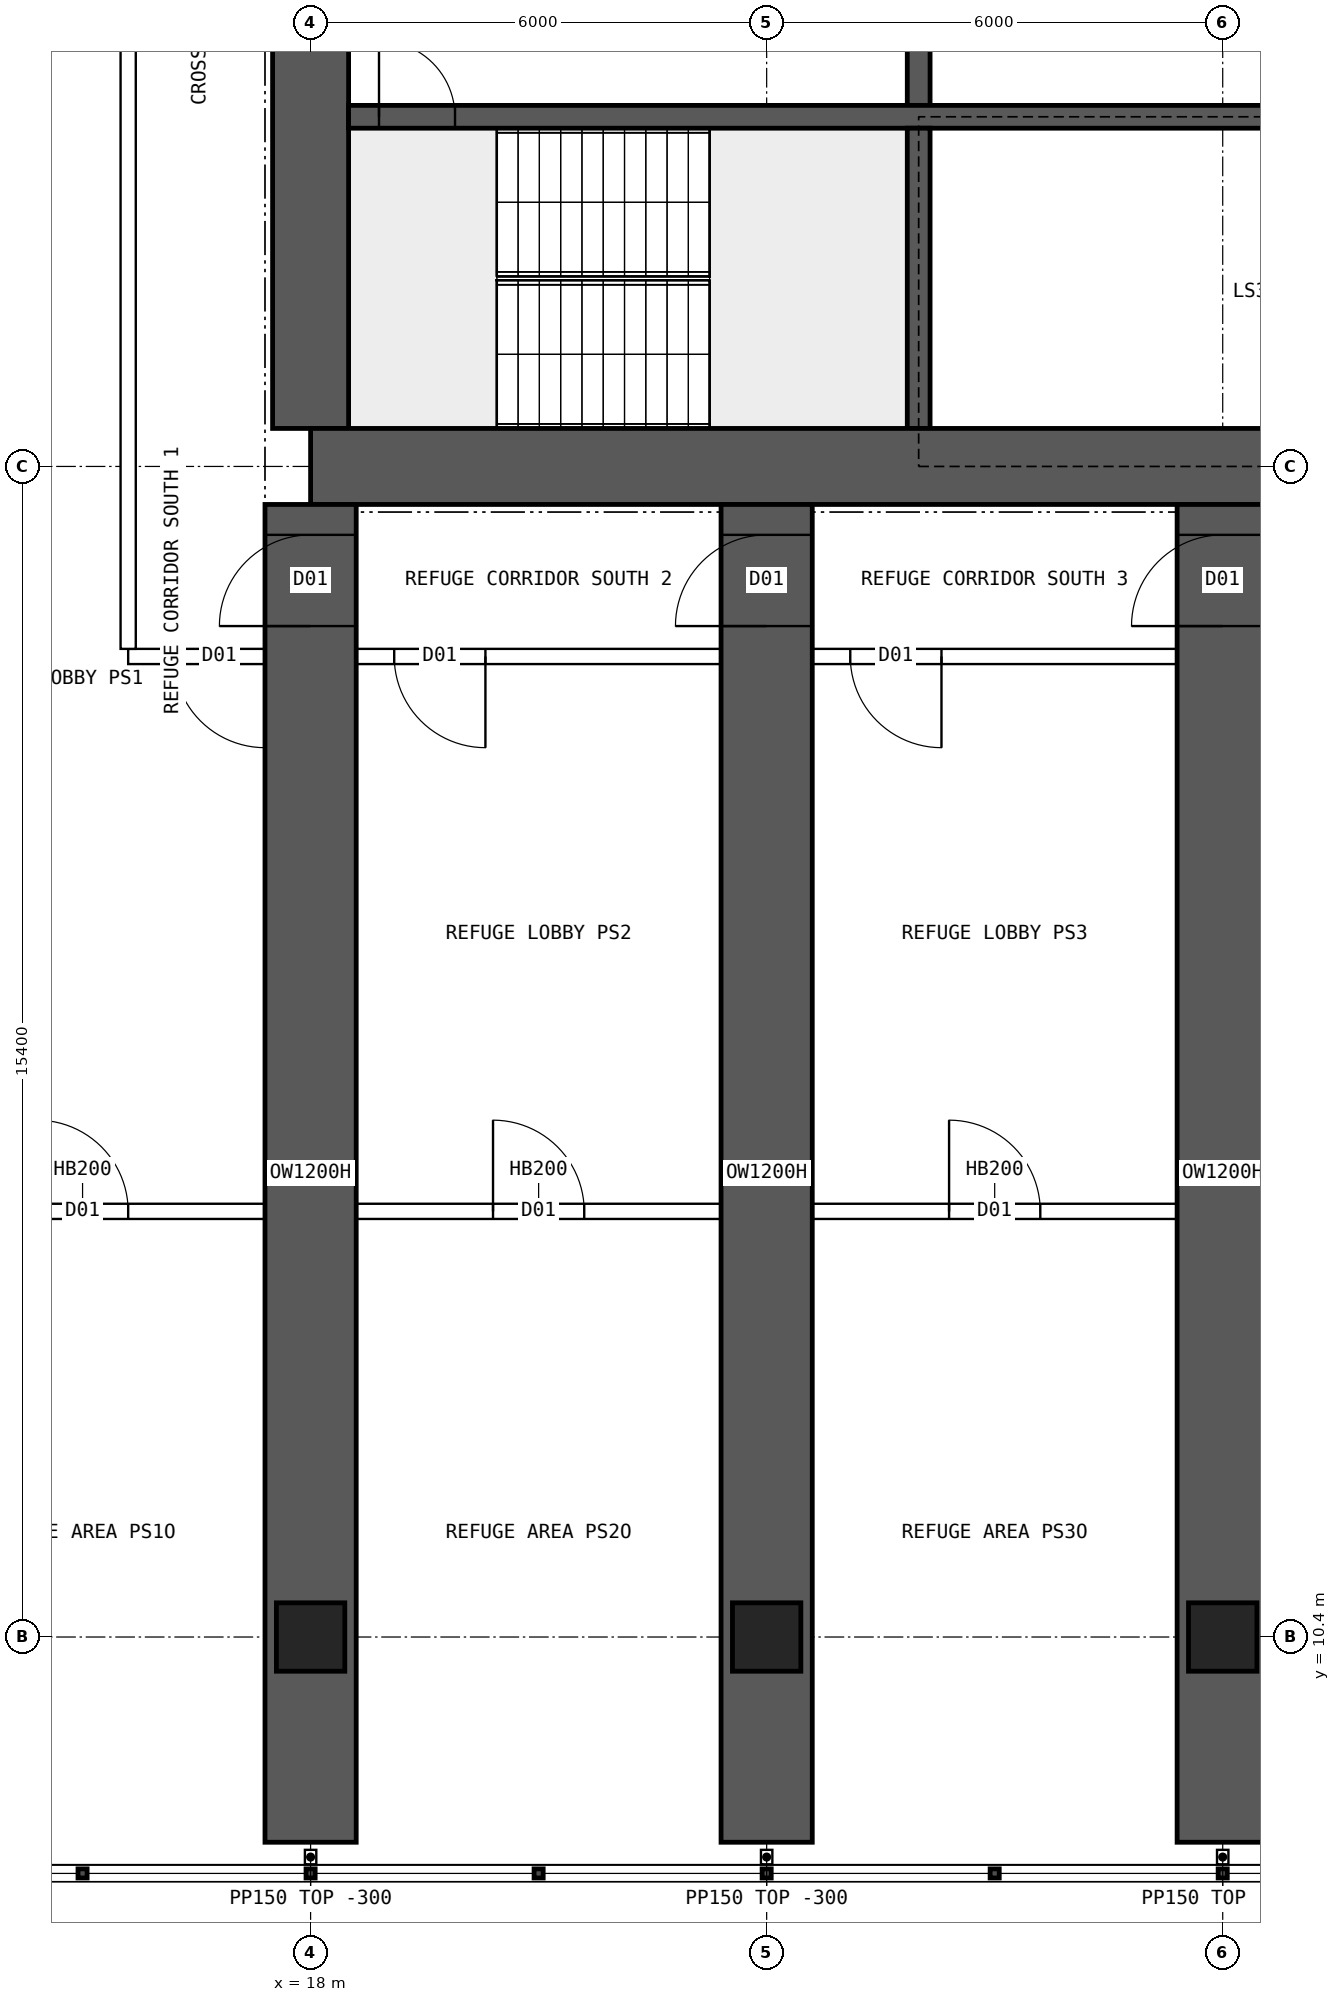
"""IFC4 building model, lengths in metres.
Left out: names, types, materials, properties, quantities, classifications, styles, units other than length and angle.
Written with IfcOpenShell. Run it as: python <this file> out.ifc"""

import sys

from ifc_helpers import new_model, si_unit, direction, frame, frame_2d, origin, origin_2d, place, context, subcontext, project, spatial, rectangle, hollow_rectangle, extrude, element, fill, save


model = new_model("IFC4")
c1 = context("Model", 3, precision=1e-05, world=origin(), true_north=direction((0.0, 1.0)))
c2 = subcontext(c1, "Body", "Model", "MODEL_VIEW")
j1 = project(units=[si_unit("LENGTHUNIT", "METRE"), si_unit("PLANEANGLEUNIT", "RADIAN")], contexts=[c1])
p1 = place(None, origin())
s1 = spatial("IfcSite", under=j1, at=p1, CompositionType="ELEMENT")
p2 = place(p1, origin())
s2 = spatial("IfcBuilding", under=s1, at=p2, CompositionType="ELEMENT")
p3 = place(p2, frame((0.0, 0.0, 68.95)))
s3 = spatial("IfcBuildingStorey", under=s2, at=p3, CompositionType="ELEMENT", Elevation=68.95)
for number, where, z_axis, x_axis in (
    (1, (18.0, 10.4, 0.0), (0.0, 0.0, 1.0), (1.0, 0.0, 0.0)),
    (2, (24.0, 10.4, 0.0), (0.0, 0.0, 1.0), (1.0, 0.0, 0.0)),
    (3, (30.0, 10.4, 0.0), (0.0, 0.0, 1.0), (1.0, 0.0, 0.0)),
):
    element("IfcColumn", number, at=place(p3, frame(where, z_axis=z_axis, x_axis=x_axis)), inside=s3, PredefinedType="COLUMN", context=c2, shape_type="SweptSolid", body=[
        extrude(hollow_rectangle(XDim=0.9, YDim=0.9, WallThickness=0.09, at=origin_2d()), origin(), (0.0, 0.0, 1.0), 7.2),
    ])
p4 = place(p3, frame((18.0, 25.8, 0.0), z_axis=(0.0, 0.0, 1.0), x_axis=(1.0, 0.0, 0.0)))
e4 = element("IfcWall", 4, at=p4, inside=s3, PredefinedType="SHEAR", context=c2, shape_type="SweptSolid", body=[
    extrude(rectangle(XDim=48.0, YDim=1.0, at=frame_2d((24.0, 0.0))), origin(), (0.0, 0.0, 1.0), 7.2),
])
p5 = place(p3, frame((18.0, 26.3, 0.0), z_axis=(0.0, 0.0, 1.0), x_axis=(0.0, 1.0, 0.0)))
e5 = element("IfcWall", 5, at=p5, inside=s3, PredefinedType="SHEAR", context=c2, shape_type="SweptSolid", body=[
    extrude(rectangle(XDim=11.4, YDim=1.0, at=frame_2d((5.7, 0.0))), origin(), (0.0, 0.0, 1.0), 7.2),
])
p6 = place(p5, frame((5.0, 0.0, 0.0)))
e6 = element("IfcOpeningElement", 6, at=p6, cuts=e5, PredefinedType="OPENING", context=c2, shape_type="SweptSolid", body=[
    extrude(rectangle(XDim=1.2, YDim=2.1, at=frame_2d((0.6, 1.05))), frame((0.0, 0.51, 0.0), z_axis=(0.0, -1.0, 0.0), x_axis=(1.0, 0.0, 0.0)), (0.0, 0.0, 1.0), 1.02),
])
p7 = place(p3, frame((18.5, 30.4, 0.0), z_axis=(0.0, 0.0, 1.0), x_axis=(1.0, 0.0, 0.0)))
e7 = element("IfcWall", 7, at=p7, inside=s3, PredefinedType="SHEAR", context=c2, shape_type="SweptSolid", body=[
    extrude(rectangle(XDim=47.0, YDim=0.3, at=frame_2d((23.5, 0.0))), origin(), (0.0, 0.0, 1.0), 7.2),
])
p8 = place(p7, frame((0.4, 0.0, 0.0)))
e8 = element("IfcOpeningElement", 8, at=p8, cuts=e7, PredefinedType="OPENING", context=c2, shape_type="SweptSolid", body=[
    extrude(rectangle(XDim=1.0, YDim=2.1, at=frame_2d((0.5, 1.05))), frame((0.0, 0.16, 0.0), z_axis=(0.0, -1.0, 0.0), x_axis=(1.0, 0.0, 0.0)), (0.0, 0.0, 1.0), 0.32),
])
p9 = place(p7, frame((45.6, 0.0, 0.0)))
e9 = element("IfcOpeningElement", 9, at=p9, cuts=e7, PredefinedType="OPENING", context=c2, shape_type="SweptSolid", body=[
    extrude(rectangle(XDim=1.0, YDim=2.1, at=frame_2d((0.5, 1.05))), frame((0.0, 0.16, 0.0), z_axis=(0.0, -1.0, 0.0), x_axis=(1.0, 0.0, 0.0)), (0.0, 0.0, 1.0), 0.32),
])
p10 = place(p7, frame((30.117, 0.0, 0.0)))
e10 = element("IfcOpeningElement", 10, at=p10, cuts=e7, PredefinedType="OPENING", context=c2, shape_type="SweptSolid", body=[
    extrude(rectangle(XDim=1.1, YDim=2.1, at=frame_2d((0.55, 1.05))), frame((0.0, 0.16, 0.0), z_axis=(0.0, -1.0, 0.0), x_axis=(1.0, 0.0, 0.0)), (0.0, 0.0, 1.0), 0.32),
])
p11 = place(p7, frame((33.65, 0.0, 0.0)))
e11 = element("IfcOpeningElement", 11, at=p11, cuts=e7, PredefinedType="OPENING", context=c2, shape_type="SweptSolid", body=[
    extrude(rectangle(XDim=1.1, YDim=2.1, at=frame_2d((0.55, 1.05))), frame((0.0, 0.16, 0.0), z_axis=(0.0, -1.0, 0.0), x_axis=(1.0, 0.0, 0.0)), (0.0, 0.0, 1.0), 0.32),
])
p12 = place(p7, frame((37.183, 0.0, 0.0)))
e12 = element("IfcOpeningElement", 12, at=p12, cuts=e7, PredefinedType="OPENING", context=c2, shape_type="SweptSolid", body=[
    extrude(rectangle(XDim=1.1, YDim=2.1, at=frame_2d((0.55, 1.05))), frame((0.0, 0.16, 0.0), z_axis=(0.0, -1.0, 0.0), x_axis=(1.0, 0.0, 0.0)), (0.0, 0.0, 1.0), 0.32),
])
p13 = place(p3, frame((26.0, 26.3, 0.0), z_axis=(0.0, 0.0, 1.0), x_axis=(0.0, 1.0, 0.0)))
e13 = element("IfcWall", 13, at=p13, inside=s3, PredefinedType="SHEAR", context=c2, shape_type="SweptSolid", body=[
    extrude(rectangle(XDim=3.95, YDim=0.3, at=frame_2d((1.975, 0.0))), origin(), (0.0, 0.0, 1.0), 7.2),
])
p14 = place(p3, frame((26.0, 30.55, 0.0), z_axis=(0.0, 0.0, 1.0), x_axis=(0.0, 1.0, 0.0)))
e14 = element("IfcWall", 14, at=p14, inside=s3, PredefinedType="SHEAR", context=c2, shape_type="SweptSolid", body=[
    extrude(rectangle(XDim=3.9, YDim=0.3, at=frame_2d((1.95, 0.0))), origin(), (0.0, 0.0, 1.0), 7.2),
])
p15 = place(p14, frame((1.4, 0.0, 0.0)))
e15 = element("IfcOpeningElement", 15, at=p15, cuts=e14, PredefinedType="OPENING", context=c2, shape_type="SweptSolid", body=[
    extrude(rectangle(XDim=1.2, YDim=2.1, at=frame_2d((0.6, 1.05))), frame((0.0, 0.16, 0.0), z_axis=(0.0, -1.0, 0.0), x_axis=(1.0, 0.0, 0.0)), (0.0, 0.0, 1.0), 0.32),
])
p16 = place(p3, frame((18.0, 7.7, 0.0), z_axis=(0.0, 0.0, 1.0), x_axis=(0.0, 1.0, 0.0)))
e16 = element("IfcWall", 16, at=p16, inside=s3, PredefinedType="SHEAR", context=c2, shape_type="SweptSolid", body=[
    extrude(rectangle(XDim=17.6, YDim=1.2, at=frame_2d((8.8, 0.0))), origin(), (0.0, 0.0, 1.0), 7.2),
])
p17 = place(p16, frame((16.0, 0.0, 0.0)))
e17 = element("IfcOpeningElement", 17, at=p17, cuts=e16, PredefinedType="OPENING", context=c2, shape_type="SweptSolid", body=[
    extrude(rectangle(XDim=1.2, YDim=2.1, at=frame_2d((0.6, 1.05))), frame((0.0, 0.61, 0.0), z_axis=(0.0, -1.0, 0.0), x_axis=(1.0, 0.0, 0.0)), (0.0, 0.0, 1.0), 1.22),
])
p18 = place(p3, frame((24.0, 7.7, 0.0), z_axis=(0.0, 0.0, 1.0), x_axis=(0.0, 1.0, 0.0)))
e18 = element("IfcWall", 18, at=p18, inside=s3, PredefinedType="SHEAR", context=c2, shape_type="SweptSolid", body=[
    extrude(rectangle(XDim=17.6, YDim=1.2, at=frame_2d((8.8, 0.0))), origin(), (0.0, 0.0, 1.0), 7.2),
])
p19 = place(p18, frame((16.0, 0.0, 0.0)))
e19 = element("IfcOpeningElement", 19, at=p19, cuts=e18, PredefinedType="OPENING", context=c2, shape_type="SweptSolid", body=[
    extrude(rectangle(XDim=1.2, YDim=2.1, at=frame_2d((0.6, 1.05))), frame((0.0, 0.61, 0.0), z_axis=(0.0, -1.0, 0.0), x_axis=(1.0, 0.0, 0.0)), (0.0, 0.0, 1.0), 1.22),
])
p20 = place(p3, frame((30.0, 7.7, 0.0), z_axis=(0.0, 0.0, 1.0), x_axis=(0.0, 1.0, 0.0)))
e20 = element("IfcWall", 20, at=p20, inside=s3, PredefinedType="SHEAR", context=c2, shape_type="SweptSolid", body=[
    extrude(rectangle(XDim=17.6, YDim=1.2, at=frame_2d((8.8, 0.0))), origin(), (0.0, 0.0, 1.0), 7.2),
])
p21 = place(p20, frame((16.0, 0.0, 0.0)))
e21 = element("IfcOpeningElement", 21, at=p21, cuts=e20, PredefinedType="OPENING", context=c2, shape_type="SweptSolid", body=[
    extrude(rectangle(XDim=1.2, YDim=2.1, at=frame_2d((0.6, 1.05))), frame((0.0, 0.61, 0.0), z_axis=(0.0, -1.0, 0.0), x_axis=(1.0, 0.0, 0.0)), (0.0, 0.0, 1.0), 1.22),
])
p22 = place(p3, frame((68.4, 23.3, 0.0), z_axis=(0.0, 0.0, 1.0), x_axis=(-1.0, 0.0, 0.0)))
e22 = element("IfcWall", 22, at=p22, inside=s3, PredefinedType="SOLIDWALL", context=c2, shape_type="SweptSolid", body=[
    extrude(rectangle(XDim=52.8, YDim=0.2, at=frame_2d((26.4, 0.0))), origin(), (0.0, 0.0, 1.0), 6.9),
])
p23 = place(p22, frame((51.0, 0.0, 0.0)))
e23 = element("IfcOpeningElement", 23, at=p23, cuts=e22, PredefinedType="OPENING", context=c2, shape_type="SweptSolid", body=[
    extrude(rectangle(XDim=1.2, YDim=2.1, at=frame_2d((0.6, 1.05))), frame((0.0, 0.11, 0.0), z_axis=(0.0, -1.0, 0.0), x_axis=(1.0, 0.0, 0.0)), (0.0, 0.0, 1.0), 0.22),
])
p24 = place(p22, frame((48.1, 0.0, 0.0)))
e24 = element("IfcOpeningElement", 24, at=p24, cuts=e22, PredefinedType="OPENING", context=c2, shape_type="SweptSolid", body=[
    extrude(rectangle(XDim=1.2, YDim=2.1, at=frame_2d((0.6, 1.05))), frame((0.0, 0.11, 0.0), z_axis=(0.0, -1.0, 0.0), x_axis=(1.0, 0.0, 0.0)), (0.0, 0.0, 1.0), 0.22),
])
p25 = place(p22, frame((42.1, 0.0, 0.0)))
e25 = element("IfcOpeningElement", 25, at=p25, cuts=e22, PredefinedType="OPENING", context=c2, shape_type="SweptSolid", body=[
    extrude(rectangle(XDim=1.2, YDim=2.1, at=frame_2d((0.6, 1.05))), frame((0.0, 0.11, 0.0), z_axis=(0.0, -1.0, 0.0), x_axis=(1.0, 0.0, 0.0)), (0.0, 0.0, 1.0), 0.22),
])
p26 = place(p22, frame((36.1, 0.0, 0.0)))
e26 = element("IfcOpeningElement", 26, at=p26, cuts=e22, PredefinedType="OPENING", context=c2, shape_type="SweptSolid", body=[
    extrude(rectangle(XDim=1.2, YDim=2.1, at=frame_2d((0.6, 1.05))), frame((0.0, 0.11, 0.0), z_axis=(0.0, -1.0, 0.0), x_axis=(1.0, 0.0, 0.0)), (0.0, 0.0, 1.0), 0.22),
])
p27 = place(p22, frame((30.1, 0.0, 0.0)))
e27 = element("IfcOpeningElement", 27, at=p27, cuts=e22, PredefinedType="OPENING", context=c2, shape_type="SweptSolid", body=[
    extrude(rectangle(XDim=1.2, YDim=2.1, at=frame_2d((0.6, 1.05))), frame((0.0, 0.11, 0.0), z_axis=(0.0, -1.0, 0.0), x_axis=(1.0, 0.0, 0.0)), (0.0, 0.0, 1.0), 0.22),
])
p28 = place(p22, frame((24.1, 0.0, 0.0)))
e28 = element("IfcOpeningElement", 28, at=p28, cuts=e22, PredefinedType="OPENING", context=c2, shape_type="SweptSolid", body=[
    extrude(rectangle(XDim=1.2, YDim=2.1, at=frame_2d((0.6, 1.05))), frame((0.0, 0.11, 0.0), z_axis=(0.0, -1.0, 0.0), x_axis=(1.0, 0.0, 0.0)), (0.0, 0.0, 1.0), 0.22),
])
p29 = place(p22, frame((18.1, 0.0, 0.0)))
e29 = element("IfcOpeningElement", 29, at=p29, cuts=e22, PredefinedType="OPENING", context=c2, shape_type="SweptSolid", body=[
    extrude(rectangle(XDim=1.2, YDim=2.1, at=frame_2d((0.6, 1.05))), frame((0.0, 0.11, 0.0), z_axis=(0.0, -1.0, 0.0), x_axis=(1.0, 0.0, 0.0)), (0.0, 0.0, 1.0), 0.22),
])
p30 = place(p22, frame((12.1, 0.0, 0.0)))
e30 = element("IfcOpeningElement", 30, at=p30, cuts=e22, PredefinedType="OPENING", context=c2, shape_type="SweptSolid", body=[
    extrude(rectangle(XDim=1.2, YDim=2.1, at=frame_2d((0.6, 1.05))), frame((0.0, 0.11, 0.0), z_axis=(0.0, -1.0, 0.0), x_axis=(1.0, 0.0, 0.0)), (0.0, 0.0, 1.0), 0.22),
])
p31 = place(p22, frame((6.1, 0.0, 0.0)))
e31 = element("IfcOpeningElement", 31, at=p31, cuts=e22, PredefinedType="OPENING", context=c2, shape_type="SweptSolid", body=[
    extrude(rectangle(XDim=1.2, YDim=2.1, at=frame_2d((0.6, 1.05))), frame((0.0, 0.11, 0.0), z_axis=(0.0, -1.0, 0.0), x_axis=(1.0, 0.0, 0.0)), (0.0, 0.0, 1.0), 0.22),
])
p32 = place(p22, frame((0.1, 0.0, 0.0)))
e32 = element("IfcOpeningElement", 32, at=p32, cuts=e22, PredefinedType="OPENING", context=c2, shape_type="SweptSolid", body=[
    extrude(rectangle(XDim=1.2, YDim=2.1, at=frame_2d((0.6, 1.05))), frame((0.0, 0.11, 0.0), z_axis=(0.0, -1.0, 0.0), x_axis=(1.0, 0.0, 0.0)), (0.0, 0.0, 1.0), 0.22),
])
p33 = place(p3, frame((15.6, 23.4, 0.0), z_axis=(0.0, 0.0, 1.0), x_axis=(0.0, 1.0, 0.0)))
e33 = element("IfcWall", 33, at=p33, inside=s3, PredefinedType="SOLIDWALL", context=c2, shape_type="SweptSolid", body=[
    extrude(rectangle(XDim=17.2, YDim=0.2, at=frame_2d((8.6, 0.0))), origin(), (0.0, 0.0, 1.0), 6.9),
])
p34 = place(p3, frame((12.5, 16.0, 0.0), z_axis=(0.0, 0.0, 1.0), x_axis=(1.0, 0.0, 0.0)))
e34 = element("IfcWall", 34, at=p34, inside=s3, PredefinedType="SOLIDWALL", context=c2, shape_type="SweptSolid", body=[
    extrude(rectangle(XDim=5.0, YDim=0.2, at=frame_2d((2.5, 0.0))), origin(), (0.0, 0.0, 1.0), 6.9),
])
p35 = place(p34, frame((1.9, 0.0, 0.0)))
e35 = element("IfcOpeningElement", 35, at=p35, cuts=e34, PredefinedType="OPENING", context=c2, shape_type="SweptSolid", body=[
    extrude(rectangle(XDim=1.2, YDim=2.1, at=frame_2d((0.6, 1.05))), frame((0.0, 0.11, 0.0), z_axis=(0.0, -1.0, 0.0), x_axis=(1.0, 0.0, 0.0)), (0.0, 0.0, 1.0), 0.22),
])
p36 = place(p3, frame((18.5, 16.0, 0.0), z_axis=(0.0, 0.0, 1.0), x_axis=(1.0, 0.0, 0.0)))
e36 = element("IfcWall", 36, at=p36, inside=s3, PredefinedType="SOLIDWALL", context=c2, shape_type="SweptSolid", body=[
    extrude(rectangle(XDim=5.0, YDim=0.2, at=frame_2d((2.5, 0.0))), origin(), (0.0, 0.0, 1.0), 6.9),
])
p37 = place(p36, frame((1.9, 0.0, 0.0)))
e37 = element("IfcOpeningElement", 37, at=p37, cuts=e36, PredefinedType="OPENING", context=c2, shape_type="SweptSolid", body=[
    extrude(rectangle(XDim=1.2, YDim=2.1, at=frame_2d((0.6, 1.05))), frame((0.0, 0.11, 0.0), z_axis=(0.0, -1.0, 0.0), x_axis=(1.0, 0.0, 0.0)), (0.0, 0.0, 1.0), 0.22),
])
p38 = place(p3, frame((24.5, 16.0, 0.0), z_axis=(0.0, 0.0, 1.0), x_axis=(1.0, 0.0, 0.0)))
e38 = element("IfcWall", 38, at=p38, inside=s3, PredefinedType="SOLIDWALL", context=c2, shape_type="SweptSolid", body=[
    extrude(rectangle(XDim=5.0, YDim=0.2, at=frame_2d((2.5, 0.0))), origin(), (0.0, 0.0, 1.0), 6.9),
])
p39 = place(p38, frame((1.9, 0.0, 0.0)))
e39 = element("IfcOpeningElement", 39, at=p39, cuts=e38, PredefinedType="OPENING", context=c2, shape_type="SweptSolid", body=[
    extrude(rectangle(XDim=1.2, YDim=2.1, at=frame_2d((0.6, 1.05))), frame((0.0, 0.11, 0.0), z_axis=(0.0, -1.0, 0.0), x_axis=(1.0, 0.0, 0.0)), (0.0, 0.0, 1.0), 0.22),
])
for number, where, z_axis, x_axis in (
    (40, (18.0, 7.6, 0.0), (0.0, 0.0, 1.0), (0.0, -1.0, 0.0)),
    (41, (24.0, 7.6, 0.0), (0.0, 0.0, 1.0), (0.0, -1.0, 0.0)),
    (42, (30.0, 7.6, 0.0), (0.0, 0.0, 1.0), (0.0, -1.0, 0.0)),
):
    element("IfcWall", number, at=place(p3, frame(where, z_axis=z_axis, x_axis=x_axis)), inside=s3, PredefinedType="PARTITIONING", context=c2, shape_type="SweptSolid", body=[
        extrude(rectangle(XDim=0.19, YDim=0.15, at=frame_2d((0.095, 0.0))), origin(), (0.0, 0.0, 1.0), 6.9),
    ])
p40 = place(p8, origin())
e43 = element("IfcDoor", 43, at=p40, inside=s3, OperationType="SINGLE_SWING_LEFT", PredefinedType="DOOR", context=c2, shape_type="SweptSolid", body=[
    extrude(rectangle(XDim=1.0, YDim=2.1, at=frame_2d((0.5, 1.05))), frame((0.0, 0.025, 0.0), z_axis=(0.0, -1.0, 0.0), x_axis=(1.0, 0.0, 0.0)), (0.0, 0.0, 1.0), 0.05),
])
fill(e8, e43)
p41 = place(p35, origin())
e44 = element("IfcDoor", 44, at=p41, inside=s3, OperationType="SINGLE_SWING_LEFT", PredefinedType="DOOR", context=c2, shape_type="SweptSolid", body=[
    extrude(rectangle(XDim=1.2, YDim=2.1, at=frame_2d((0.6, 1.05))), frame((0.0, 0.025, 0.0), z_axis=(0.0, -1.0, 0.0), x_axis=(1.0, 0.0, 0.0)), (0.0, 0.0, 1.0), 0.05),
])
fill(e35, e44)
p42 = place(p37, origin())
e45 = element("IfcDoor", 45, at=p42, inside=s3, OperationType="SINGLE_SWING_LEFT", PredefinedType="DOOR", context=c2, shape_type="SweptSolid", body=[
    extrude(rectangle(XDim=1.2, YDim=2.1, at=frame_2d((0.6, 1.05))), frame((0.0, 0.025, 0.0), z_axis=(0.0, -1.0, 0.0), x_axis=(1.0, 0.0, 0.0)), (0.0, 0.0, 1.0), 0.05),
])
fill(e37, e45)
p43 = place(p39, origin())
e46 = element("IfcDoor", 46, at=p43, inside=s3, OperationType="SINGLE_SWING_LEFT", PredefinedType="DOOR", context=c2, shape_type="SweptSolid", body=[
    extrude(rectangle(XDim=1.2, YDim=2.1, at=frame_2d((0.6, 1.05))), frame((0.0, 0.025, 0.0), z_axis=(0.0, -1.0, 0.0), x_axis=(1.0, 0.0, 0.0)), (0.0, 0.0, 1.0), 0.05),
])
fill(e39, e46)
p44 = place(p23, origin())
e47 = element("IfcDoor", 47, at=p44, inside=s3, OperationType="SINGLE_SWING_LEFT", PredefinedType="DOOR", context=c2, shape_type="SweptSolid", body=[
    extrude(rectangle(XDim=1.2, YDim=2.1, at=frame_2d((0.6, 1.05))), frame((0.0, 0.025, 0.0), z_axis=(0.0, -1.0, 0.0), x_axis=(1.0, 0.0, 0.0)), (0.0, 0.0, 1.0), 0.05),
])
fill(e23, e47)
p45 = place(p24, origin())
e48 = element("IfcDoor", 48, at=p45, inside=s3, OperationType="SINGLE_SWING_LEFT", PredefinedType="DOOR", context=c2, shape_type="SweptSolid", body=[
    extrude(rectangle(XDim=1.2, YDim=2.1, at=frame_2d((0.6, 1.05))), frame((0.0, 0.025, 0.0), z_axis=(0.0, -1.0, 0.0), x_axis=(1.0, 0.0, 0.0)), (0.0, 0.0, 1.0), 0.05),
])
fill(e24, e48)
p46 = place(p25, origin())
e49 = element("IfcDoor", 49, at=p46, inside=s3, OperationType="SINGLE_SWING_LEFT", PredefinedType="DOOR", context=c2, shape_type="SweptSolid", body=[
    extrude(rectangle(XDim=1.2, YDim=2.1, at=frame_2d((0.6, 1.05))), frame((0.0, 0.025, 0.0), z_axis=(0.0, -1.0, 0.0), x_axis=(1.0, 0.0, 0.0)), (0.0, 0.0, 1.0), 0.05),
])
fill(e25, e49)
p47 = place(p17, origin())
e50 = element("IfcDoor", 50, at=p47, inside=s3, OperationType="SINGLE_SWING_LEFT", PredefinedType="DOOR", context=c2, shape_type="SweptSolid", body=[
    extrude(rectangle(XDim=1.2, YDim=2.1, at=frame_2d((0.6, 1.05))), frame((0.0, 0.025, 0.0), z_axis=(0.0, -1.0, 0.0), x_axis=(1.0, 0.0, 0.0)), (0.0, 0.0, 1.0), 0.05),
])
fill(e17, e50)
p48 = place(p19, origin())
e51 = element("IfcDoor", 51, at=p48, inside=s3, OperationType="SINGLE_SWING_LEFT", PredefinedType="DOOR", context=c2, shape_type="SweptSolid", body=[
    extrude(rectangle(XDim=1.2, YDim=2.1, at=frame_2d((0.6, 1.05))), frame((0.0, 0.025, 0.0), z_axis=(0.0, -1.0, 0.0), x_axis=(1.0, 0.0, 0.0)), (0.0, 0.0, 1.0), 0.05),
])
fill(e19, e51)
p49 = place(p21, origin())
e52 = element("IfcDoor", 52, at=p49, inside=s3, OperationType="SINGLE_SWING_LEFT", PredefinedType="DOOR", context=c2, shape_type="SweptSolid", body=[
    extrude(rectangle(XDim=1.2, YDim=2.1, at=frame_2d((0.6, 1.05))), frame((0.0, 0.025, 0.0), z_axis=(0.0, -1.0, 0.0), x_axis=(1.0, 0.0, 0.0)), (0.0, 0.0, 1.0), 0.05),
])
fill(e21, e52)
save(model, sys.argv[1])
